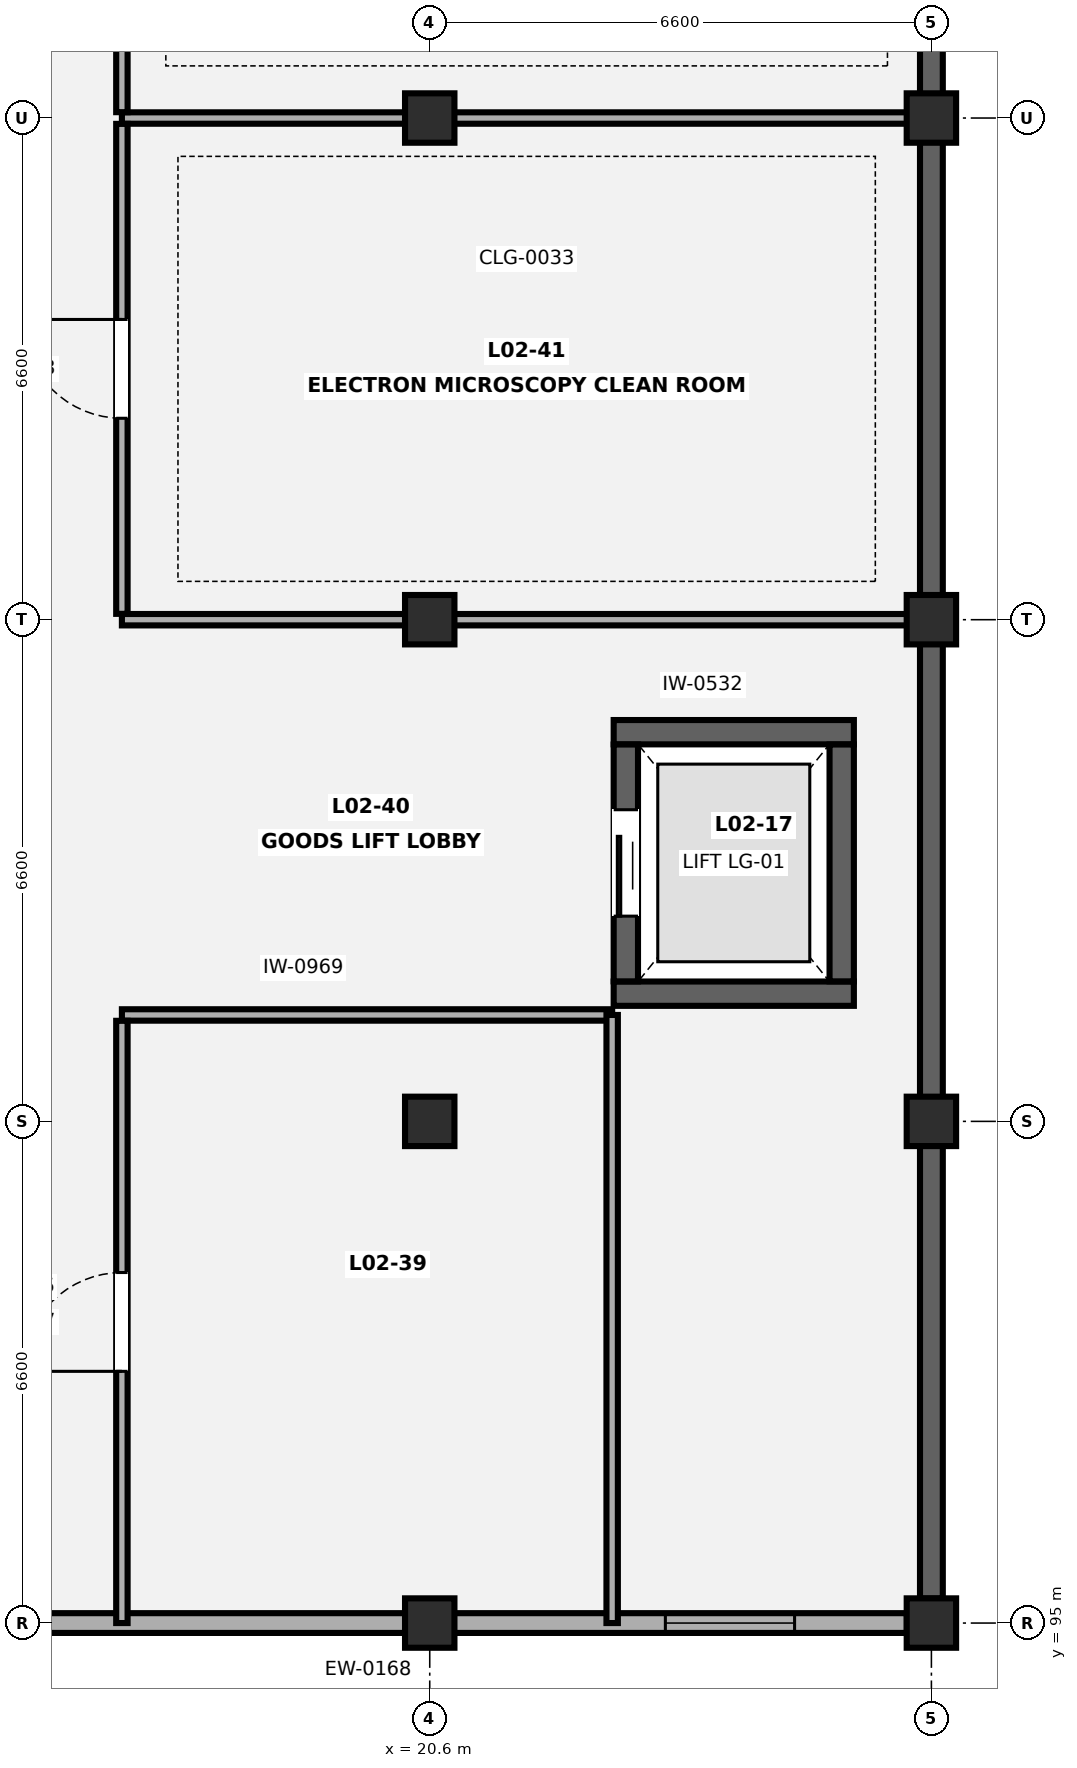
"""IFC4 building model, lengths in metres.
Left out: names, types, materials, properties, quantities, classifications, styles, units other than length and angle.
Written with IfcOpenShell. Run it as: python <this file> out.ifc"""

import sys

from ifc_helpers import new_model, si_unit, direction, frame, frame_2d, origin, origin_2d, place, context, subcontext, project, spatial, rectangle, extrude, element, fill, save


model = new_model("IFC4")
c1 = context("Model", 3, precision=1e-05, world=origin(), true_north=direction((0.0, 1.0)))
c2 = subcontext(c1, "Body", "Model", "MODEL_VIEW")
j1 = project(units=[si_unit("LENGTHUNIT", "METRE"), si_unit("PLANEANGLEUNIT", "RADIAN")], contexts=[c1])
p1 = place(None, origin())
s1 = spatial("IfcSite", under=j1, at=p1, CompositionType="ELEMENT")
p2 = place(p1, origin())
s2 = spatial("IfcBuilding", under=s1, at=p2, CompositionType="ELEMENT")
p3 = place(p2, frame((0.0, 0.0, 9.1)))
s3 = spatial("IfcBuildingStorey", under=s2, at=p3, CompositionType="ELEMENT", Elevation=9.1)
for number, where, z_axis, x_axis in (
    (1, (20.6, 95.0, 0.0), (0.0, 0.0, 1.0), (1.0, 0.0, 0.0)),
    (2, (20.6, 101.6, 0.0), (0.0, 0.0, 1.0), (1.0, 0.0, 0.0)),
    (3, (20.6, 108.2, 0.0), (0.0, 0.0, 1.0), (1.0, 0.0, 0.0)),
    (4, (20.6, 114.8, 0.0), (0.0, 0.0, 1.0), (1.0, 0.0, 0.0)),
    (5, (27.2, 95.0, 0.0), (0.0, 0.0, 1.0), (1.0, 0.0, 0.0)),
    (6, (27.2, 101.6, 0.0), (0.0, 0.0, 1.0), (1.0, 0.0, 0.0)),
    (7, (27.2, 108.2, 0.0), (0.0, 0.0, 1.0), (1.0, 0.0, 0.0)),
    (8, (27.2, 114.8, 0.0), (0.0, 0.0, 1.0), (1.0, 0.0, 0.0)),
):
    element("IfcColumn", number, at=place(p3, frame(where, z_axis=z_axis, x_axis=x_axis)), inside=s3, PredefinedType="COLUMN", context=c2, shape_type="SweptSolid", body=[
        extrude(rectangle(XDim=0.65, YDim=0.65, at=origin_2d()), origin(), (0.0, 0.0, 1.0), 4.2),
    ])
p4 = place(p3, frame((27.2, 161.877, 0.0), z_axis=(0.0, 0.0, 1.0), x_axis=(0.0, -1.0, 0.0)))
e9 = element("IfcWall", 9, at=p4, inside=s3, PredefinedType="SOLIDWALL", context=c2, shape_type="SweptSolid", body=[
    extrude(rectangle(XDim=66.554, YDim=0.3, at=frame_2d((33.277, 0.0))), origin(), (0.0, 0.0, 1.0), 3.84),
])
p5 = place(p3, frame((26.877, 95.0, 0.0), z_axis=(0.0, 0.0, 1.0), x_axis=(-1.0, 0.0, 0.0)))
e10 = element("IfcWall", 10, at=p5, inside=s3, PredefinedType="SOLIDWALL", context=c2, shape_type="SweptSolid", body=[
    extrude(rectangle(XDim=19.154, YDim=0.26, at=frame_2d((9.577, 0.0))), origin(), (0.0, 0.0, 1.0), 2.48),
])
p6 = place(p5, frame((1.477, 0.0, 0.85)))
e11 = element("IfcOpeningElement", 11, at=p6, cuts=e10, PredefinedType="OPENING", context=c2, shape_type="SweptSolid", body=[
    extrude(rectangle(XDim=1.7, YDim=1.4, at=frame_2d((0.85, 0.7))), frame((0.0, 0.14, 0.0), z_axis=(0.0, -1.0, 0.0), x_axis=(1.0, 0.0, 0.0)), (0.0, 0.0, 1.0), 0.28),
])
for number, where, z_axis, x_axis in (
    (12, (23.02, 103.28, 0.0), (0.0, 0.0, 1.0), (1.0, 0.0, 0.0)),
    (13, (23.02, 106.72, 0.0), (0.0, 0.0, 1.0), (1.0, 0.0, 0.0)),
):
    element("IfcWall", number, at=place(p3, frame(where, z_axis=z_axis, x_axis=x_axis)), inside=s3, PredefinedType="SHEAR", context=c2, shape_type="SweptSolid", body=[
        extrude(rectangle(XDim=3.16, YDim=0.32, at=frame_2d((1.58, 0.0))), origin(), (0.0, 0.0, 1.0), 3.85),
    ])
p7 = place(p3, frame((23.18, 103.442, 0.0), z_axis=(0.0, 0.0, 1.0), x_axis=(0.0, 1.0, 0.0)))
e14 = element("IfcWall", 14, at=p7, inside=s3, PredefinedType="SHEAR", context=c2, shape_type="SweptSolid", body=[
    extrude(rectangle(XDim=3.116, YDim=0.32, at=frame_2d((1.558, 0.0))), origin(), (0.0, 0.0, 1.0), 3.85),
])
p8 = place(p7, frame((0.858, 0.0, 0.0)))
e15 = element("IfcOpeningElement", 15, at=p8, cuts=e14, PredefinedType="OPENING", context=c2, shape_type="SweptSolid", body=[
    extrude(rectangle(XDim=1.4, YDim=2.25, at=frame_2d((0.7, 1.125))), frame((0.0, 0.17, 0.0), z_axis=(0.0, -1.0, 0.0), x_axis=(1.0, 0.0, 0.0)), (0.0, 0.0, 1.0), 0.34),
])
p9 = place(p3, frame((26.02, 103.442, 0.0), z_axis=(0.0, 0.0, 1.0), x_axis=(0.0, 1.0, 0.0)))
e16 = element("IfcWall", 16, at=p9, inside=s3, PredefinedType="SHEAR", context=c2, shape_type="SweptSolid", body=[
    extrude(rectangle(XDim=3.116, YDim=0.32, at=frame_2d((1.558, 0.0))), origin(), (0.0, 0.0, 1.0), 3.85),
])
p10 = place(p3, frame((16.55, 103.0, 0.0), z_axis=(0.0, 0.0, 1.0), x_axis=(1.0, 0.0, 0.0)))
e17 = element("IfcWall", 17, at=p10, inside=s3, PredefinedType="PARTITIONING", context=c2, shape_type="SweptSolid", body=[
    extrude(rectangle(XDim=6.45, YDim=0.15, at=frame_2d((3.225, 0.0))), origin(), (0.0, 0.0, 1.0), 3.85),
])
p11 = place(p3, frame((16.55, 95.0, 0.0), z_axis=(0.0, 0.0, 1.0), x_axis=(0.0, 1.0, 0.0)))
e18 = element("IfcWall", 18, at=p11, inside=s3, PredefinedType="PARTITIONING", context=c2, shape_type="SweptSolid", body=[
    extrude(rectangle(XDim=7.923, YDim=0.15, at=frame_2d((3.961, 0.0))), origin(), (0.0, 0.0, 1.0), 3.85),
])
p12 = place(p11, frame((3.312, 0.0, 0.0)))
e19 = element("IfcOpeningElement", 19, at=p12, cuts=e18, PredefinedType="OPENING", context=c2, shape_type="SweptSolid", body=[
    extrude(rectangle(XDim=1.3, YDim=2.2, at=frame_2d((0.65, 1.1))), frame((0.0, 0.085, 0.0), z_axis=(0.0, -1.0, 0.0), x_axis=(1.0, 0.0, 0.0)), (0.0, 0.0, 1.0), 0.17),
])
p13 = place(p3, frame((23.0, 95.0, 0.0), z_axis=(0.0, 0.0, 1.0), x_axis=(0.0, 1.0, 0.0)))
e20 = element("IfcWall", 20, at=p13, inside=s3, PredefinedType="PARTITIONING", context=c2, shape_type="SweptSolid", body=[
    extrude(rectangle(XDim=8.0, YDim=0.15, at=frame_2d((4.0, 0.0))), origin(), (0.0, 0.0, 1.0), 3.85),
])
for number, where, z_axis, x_axis in (
    (21, (16.55, 108.2, 0.0), (0.0, 0.0, 1.0), (1.0, 0.0, 0.0)),
    (22, (16.55, 114.8, 0.0), (0.0, 0.0, 1.0), (1.0, 0.0, 0.0)),
):
    element("IfcWall", number, at=place(p3, frame(where, z_axis=z_axis, x_axis=x_axis)), inside=s3, PredefinedType="PARTITIONING", context=c2, shape_type="SweptSolid", body=[
        extrude(rectangle(XDim=10.508, YDim=0.15, at=frame_2d((5.254, 0.0))), origin(), (0.0, 0.0, 1.0), 2.435),
    ])
p14 = place(p3, frame((16.55, 108.277, 0.0), z_axis=(0.0, 0.0, 1.0), x_axis=(0.0, 1.0, 0.0)))
e23 = element("IfcWall", 23, at=p14, inside=s3, PredefinedType="PARTITIONING", context=c2, shape_type="SweptSolid", body=[
    extrude(rectangle(XDim=6.446, YDim=0.15, at=frame_2d((3.223, 0.0))), origin(), (0.0, 0.0, 1.0), 3.85),
])
p15 = place(p14, frame((2.573, 0.0, 0.0)))
e24 = element("IfcOpeningElement", 24, at=p15, cuts=e23, PredefinedType="OPENING", context=c2, shape_type="SweptSolid", body=[
    extrude(rectangle(XDim=1.3, YDim=2.2, at=frame_2d((0.65, 1.1))), frame((0.0, 0.085, 0.0), z_axis=(0.0, -1.0, 0.0), x_axis=(1.0, 0.0, 0.0)), (0.0, 0.0, 1.0), 0.17),
])
p16 = place(p3, frame((16.55, 114.877, 0.0), z_axis=(0.0, 0.0, 1.0), x_axis=(0.0, 1.0, 0.0)))
e25 = element("IfcWall", 25, at=p16, inside=s3, PredefinedType="PARTITIONING", context=c2, shape_type="SweptSolid", body=[
    extrude(rectangle(XDim=13.046, YDim=0.15, at=frame_2d((6.523, 0.0))), origin(), (0.0, 0.0, 1.0), 3.85),
])
p17 = place(p16, frame((5.873, 0.0, 0.0)))
e26 = element("IfcOpeningElement", 26, at=p17, cuts=e25, PredefinedType="OPENING", context=c2, shape_type="SweptSolid", body=[
    extrude(rectangle(XDim=1.3, YDim=2.2, at=frame_2d((0.65, 1.1))), frame((0.0, 0.085, 0.0), z_axis=(0.0, -1.0, 0.0), x_axis=(1.0, 0.0, 0.0)), (0.0, 0.0, 1.0), 0.17),
])
p18 = place(p6, origin())
e27 = element("IfcWindow", 27, at=p18, inside=s3, PartitioningType="SINGLE_PANEL", PredefinedType="WINDOW", context=c2, shape_type="SweptSolid", body=[
    extrude(rectangle(XDim=1.7, YDim=1.4, at=frame_2d((0.85, 0.7))), frame((0.0, 0.03, 0.0), z_axis=(0.0, -1.0, 0.0), x_axis=(1.0, 0.0, 0.0)), (0.0, 0.0, 1.0), 0.06),
])
fill(e11, e27)
p19 = place(p8, origin())
e28 = element("IfcDoor", 28, at=p19, inside=s3, OperationType="DOUBLE_DOOR_SLIDING", PredefinedType="DOOR", context=c2, shape_type="SweptSolid", body=[
    extrude(rectangle(XDim=1.4, YDim=2.25, at=frame_2d((0.7, 1.125))), frame((0.0, 0.025, 0.0), z_axis=(0.0, -1.0, 0.0), x_axis=(1.0, 0.0, 0.0)), (0.0, 0.0, 1.0), 0.05),
])
fill(e15, e28)
p20 = place(p12, origin())
e29 = element("IfcDoor", 29, at=p20, inside=s3, OperationType="SINGLE_SWING_LEFT", PredefinedType="DOOR", context=c2, shape_type="SweptSolid", body=[
    extrude(rectangle(XDim=1.3, YDim=2.2, at=frame_2d((0.65, 1.1))), frame((0.0, 0.025, 0.0), z_axis=(0.0, -1.0, 0.0), x_axis=(1.0, 0.0, 0.0)), (0.0, 0.0, 1.0), 0.05),
])
fill(e19, e29)
p21 = place(p15, origin())
e30 = element("IfcDoor", 30, at=p21, inside=s3, OperationType="SINGLE_SWING_RIGHT", PredefinedType="DOOR", context=c2, shape_type="SweptSolid", body=[
    extrude(rectangle(XDim=1.3, YDim=2.2, at=frame_2d((0.65, 1.1))), frame((0.0, 0.025, 0.0), z_axis=(0.0, -1.0, 0.0), x_axis=(1.0, 0.0, 0.0)), (0.0, 0.0, 1.0), 0.05),
])
fill(e24, e30)
save(model, sys.argv[1])
